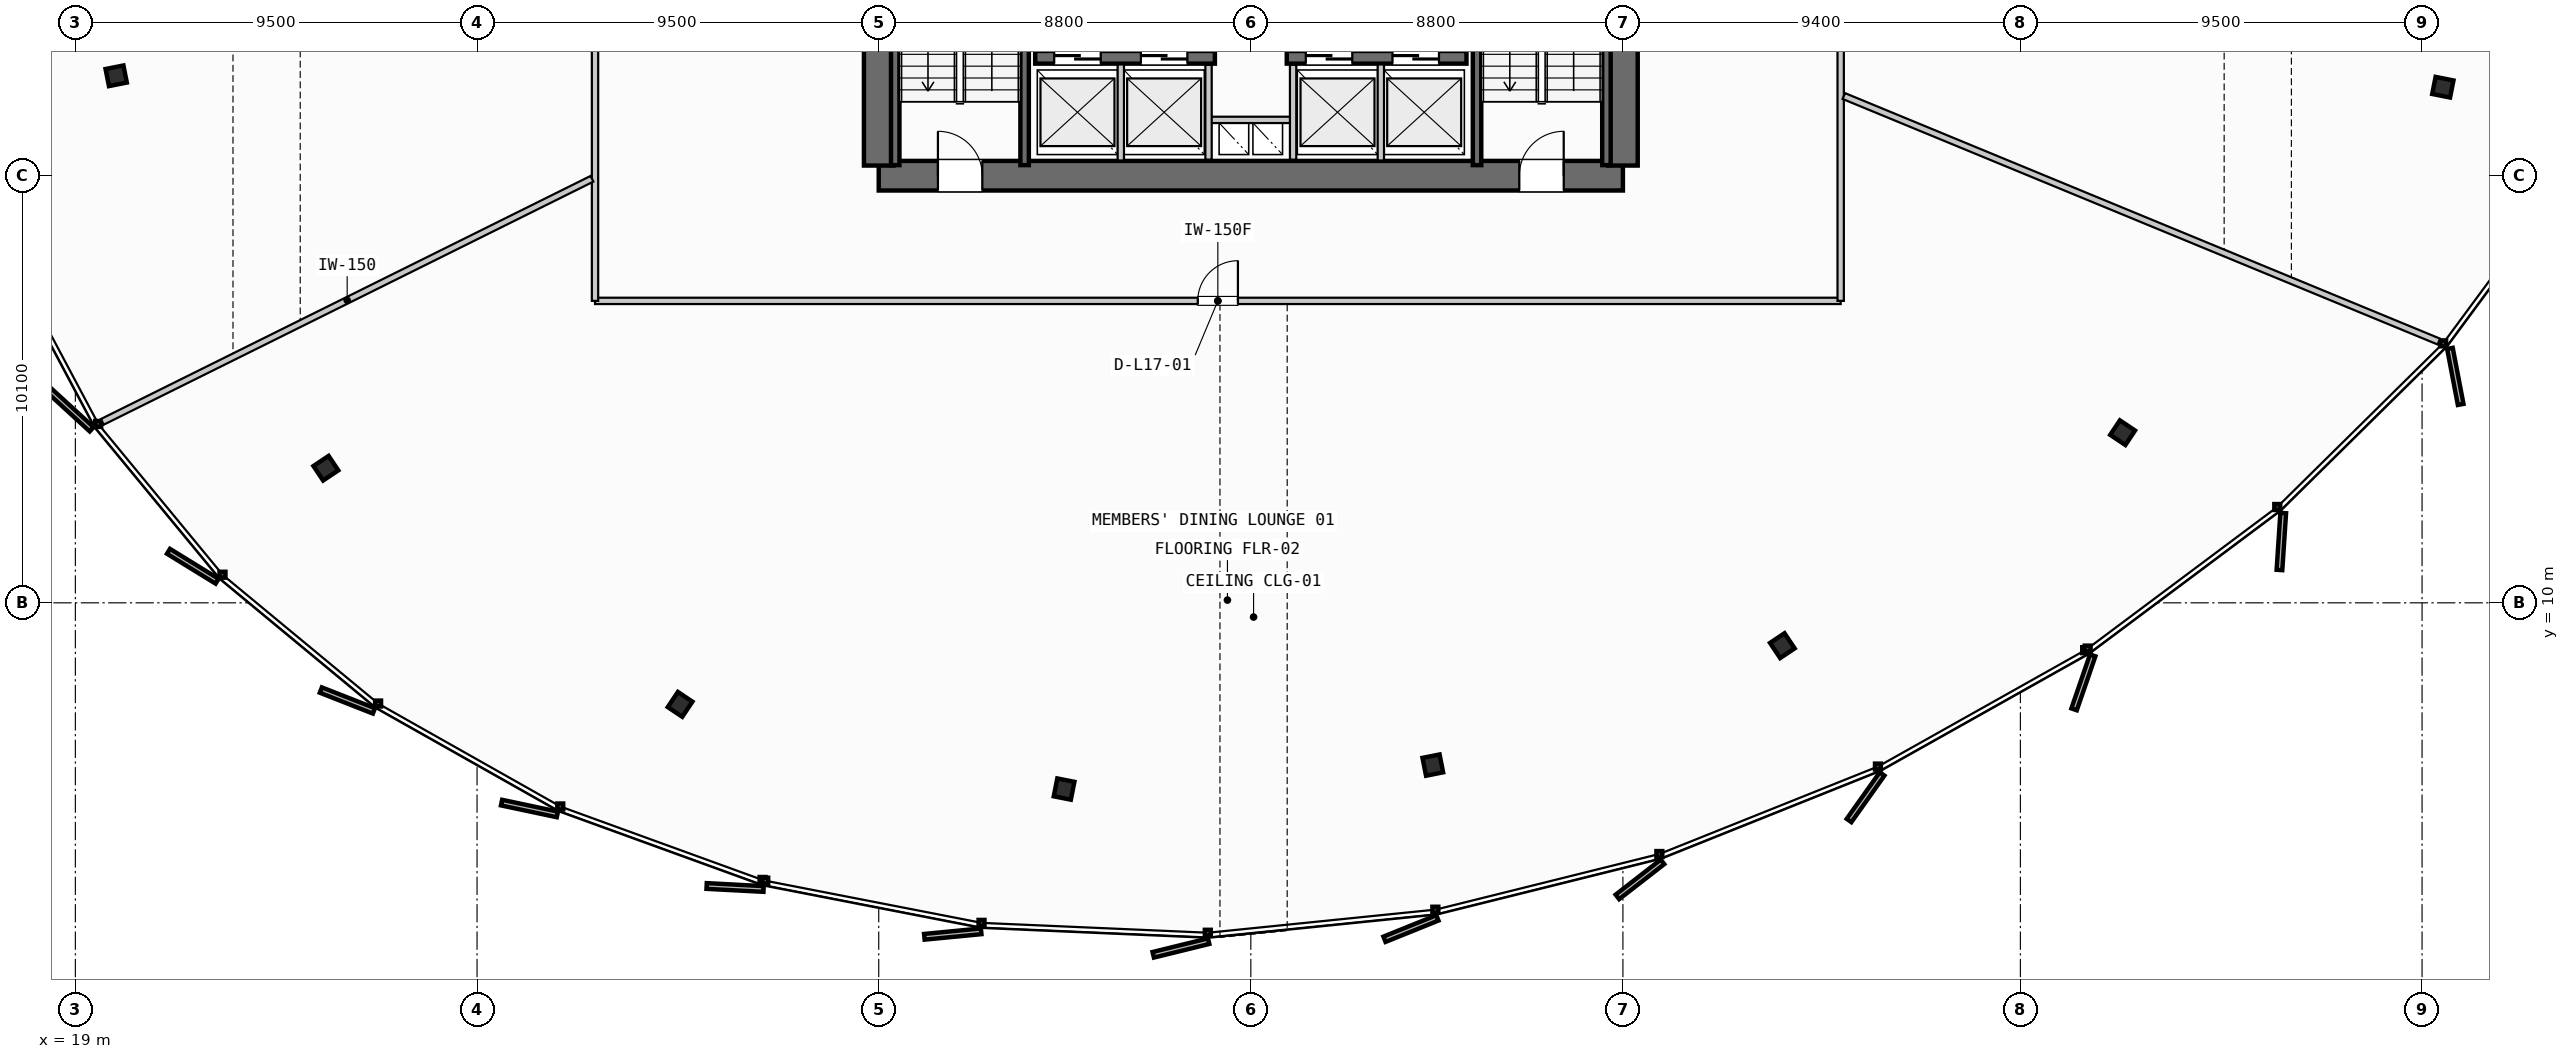
"""IFC4 building model, lengths in metres.
Left out: names, types, materials, properties, quantities, classifications, styles, units other than length and angle.
Written with IfcOpenShell. Run it as: python <this file> out.ifc"""

import sys

from ifc_helpers import new_model, si_unit, direction, frame, frame_2d, origin, origin_2d, place, context, subcontext, project, spatial, rectangle, i_section, extrude, source, transform, mapped, element, fill, save


model = new_model("IFC4")
c1 = context("Model", 3, precision=1e-05, world=origin(), true_north=direction((0.0, 1.0)))
c2 = subcontext(c1, "Body", "Model", "MODEL_VIEW")
j1 = project(units=[si_unit("LENGTHUNIT", "METRE"), si_unit("PLANEANGLEUNIT", "RADIAN")], contexts=[c1])
p1 = place(None, origin())
s1 = spatial("IfcSite", under=j1, at=p1, CompositionType="ELEMENT")
p2 = place(p1, origin())
s2 = spatial("IfcBuilding", under=s1, at=p2, CompositionType="ELEMENT")
p3 = place(p2, frame((0.0, 0.0, 71.4)))
s3 = spatial("IfcBuildingStorey", under=s2, at=p3, CompositionType="ELEMENT", Elevation=71.4)
p4 = place(p3, frame((38.0, 20.1, 0.0), z_axis=(0.0, 0.0, 1.0), x_axis=(1.0, 0.0, 0.0)))
e1 = element("IfcWall", 1, at=p4, inside=s3, PredefinedType="SHEAR", context=c2, shape_type="SweptSolid", body=[
    extrude(rectangle(XDim=17.6, YDim=0.7, at=frame_2d((8.8, 0.0))), origin(), (0.0, 0.0, 1.0), 3.54),
])
p5 = place(p4, frame((1.4, 0.0, 0.0)))
e2 = element("IfcOpeningElement", 2, at=p5, cuts=e1, PredefinedType="OPENING", context=c2, shape_type="SweptSolid", body=[
    extrude(rectangle(XDim=1.05, YDim=2.15, at=frame_2d((0.525, 1.075))), frame((0.0, 0.36, 0.0), z_axis=(0.0, -1.0, 0.0), x_axis=(1.0, 0.0, 0.0)), (0.0, 0.0, 1.0), 0.72),
])
p6 = place(p4, frame((15.15, 0.0, 0.0)))
e3 = element("IfcOpeningElement", 3, at=p6, cuts=e1, PredefinedType="OPENING", context=c2, shape_type="SweptSolid", body=[
    extrude(rectangle(XDim=1.05, YDim=2.15, at=frame_2d((0.525, 1.075))), frame((0.0, 0.36, 0.0), z_axis=(0.0, -1.0, 0.0), x_axis=(1.0, 0.0, 0.0)), (0.0, 0.0, 1.0), 0.72),
])
p7 = place(p3, frame((38.0, 35.26, 0.0), z_axis=(0.0, 0.0, 1.0), x_axis=(0.0, -1.0, 0.0)))
e4 = element("IfcWall", 4, at=p7, inside=s3, PredefinedType="SHEAR", context=c2, shape_type="SweptSolid", body=[
    extrude(rectangle(XDim=14.92, YDim=0.7, at=frame_2d((7.46, 0.0))), origin(), (0.0, 0.0, 1.0), 3.54),
])
p8 = place(p7, frame((5.21, 0.0, 0.0)))
e5 = element("IfcOpeningElement", 5, at=p8, cuts=e4, PredefinedType="OPENING", context=c2, shape_type="SweptSolid", body=[
    extrude(rectangle(XDim=1.1, YDim=2.2, at=frame_2d((0.55, 1.1))), frame((0.0, 0.36, 0.0), z_axis=(0.0, -1.0, 0.0), x_axis=(1.0, 0.0, 0.0)), (0.0, 0.0, 1.0), 0.72),
])
p9 = place(p3, frame((55.6, 20.34, 0.0), z_axis=(0.0, 0.0, 1.0), x_axis=(0.0, 1.0, 0.0)))
e6 = element("IfcWall", 6, at=p9, inside=s3, PredefinedType="SHEAR", context=c2, shape_type="SweptSolid", body=[
    extrude(rectangle(XDim=14.92, YDim=0.7, at=frame_2d((7.46, 0.0))), origin(), (0.0, 0.0, 1.0), 3.54),
])
p10 = place(p9, frame((12.71, 0.0, 0.0)))
e7 = element("IfcOpeningElement", 7, at=p10, cuts=e6, PredefinedType="OPENING", context=c2, shape_type="SweptSolid", body=[
    extrude(rectangle(XDim=1.05, YDim=2.15, at=frame_2d((0.525, 1.075))), frame((0.0, 0.36, 0.0), z_axis=(0.0, -1.0, 0.0), x_axis=(1.0, 0.0, 0.0)), (0.0, 0.0, 1.0), 0.72),
])
p11 = place(p9, frame((8.61, 0.0, 0.0)))
e8 = element("IfcOpeningElement", 8, at=p11, cuts=e6, PredefinedType="OPENING", context=c2, shape_type="SweptSolid", body=[
    extrude(rectangle(XDim=1.1, YDim=2.2, at=frame_2d((0.55, 1.1))), frame((0.0, 0.36, 0.0), z_axis=(0.0, -1.0, 0.0), x_axis=(1.0, 0.0, 0.0)), (0.0, 0.0, 1.0), 0.72),
])
p12 = place(p3, frame((41.7, 22.9, 0.0), z_axis=(0.0, 0.0, 1.0), x_axis=(1.0, 0.0, 0.0)))
e9 = element("IfcWall", 9, at=p12, inside=s3, PredefinedType="SHEAR", context=c2, shape_type="SweptSolid", body=[
    extrude(rectangle(XDim=4.25, YDim=0.3, at=frame_2d((2.125, 0.0))), origin(), (0.0, 0.0, 1.0), 3.54),
])
p13 = place(p12, frame((0.45, 0.0, 0.0)))
e10 = element("IfcOpeningElement", 10, at=p13, cuts=e9, PredefinedType="OPENING", context=c2, shape_type="SweptSolid", body=[
    extrude(rectangle(XDim=1.1, YDim=2.2, at=frame_2d((0.55, 1.1))), frame((0.0, 0.16, 0.0), z_axis=(0.0, -1.0, 0.0), x_axis=(1.0, 0.0, 0.0)), (0.0, 0.0, 1.0), 0.32),
])
p14 = place(p12, frame((2.5, 0.0, 0.0)))
e11 = element("IfcOpeningElement", 11, at=p14, cuts=e9, PredefinedType="OPENING", context=c2, shape_type="SweptSolid", body=[
    extrude(rectangle(XDim=1.1, YDim=2.2, at=frame_2d((0.55, 1.1))), frame((0.0, 0.16, 0.0), z_axis=(0.0, -1.0, 0.0), x_axis=(1.0, 0.0, 0.0)), (0.0, 0.0, 1.0), 0.32),
])
p15 = place(p3, frame((47.65, 22.9, 0.0), z_axis=(0.0, 0.0, 1.0), x_axis=(1.0, 0.0, 0.0)))
e12 = element("IfcWall", 12, at=p15, inside=s3, PredefinedType="SHEAR", context=c2, shape_type="SweptSolid", body=[
    extrude(rectangle(XDim=4.25, YDim=0.3, at=frame_2d((2.125, 0.0))), origin(), (0.0, 0.0, 1.0), 3.54),
])
p16 = place(p15, frame((0.45, 0.0, 0.0)))
e13 = element("IfcOpeningElement", 13, at=p16, cuts=e12, PredefinedType="OPENING", context=c2, shape_type="SweptSolid", body=[
    extrude(rectangle(XDim=1.1, YDim=2.2, at=frame_2d((0.55, 1.1))), frame((0.0, 0.16, 0.0), z_axis=(0.0, -1.0, 0.0), x_axis=(1.0, 0.0, 0.0)), (0.0, 0.0, 1.0), 0.32),
])
p17 = place(p15, frame((2.5, 0.0, 0.0)))
e14 = element("IfcOpeningElement", 14, at=p17, cuts=e12, PredefinedType="OPENING", context=c2, shape_type="SweptSolid", body=[
    extrude(rectangle(XDim=1.1, YDim=2.2, at=frame_2d((0.55, 1.1))), frame((0.0, 0.16, 0.0), z_axis=(0.0, -1.0, 0.0), x_axis=(1.0, 0.0, 0.0)), (0.0, 0.0, 1.0), 0.32),
])
m1 = source(origin(), c2, "Body", "SweptSolid", [
    extrude(i_section(OverallWidth=0.412, OverallDepth=0.431, WebThickness=0.042, FlangeThickness=0.068, FilletRadius=0.015, at=origin_2d()), origin(), (0.0, 0.0, 1.0), 3.54),
])
for number, where, z_axis, x_axis in (
    (15, (19.966, 22.462, 0.0), (0.0, 0.0, 1.0), (-0.981, -0.195, 0.0)),
    (16, (24.925, 13.183, 0.0), (0.0, 0.0, 1.0), (-0.831, -0.556, 0.0)),
    (17, (33.302, 7.599, 0.0), (0.0, 0.0, 1.0), (-0.556, -0.831, 0.0)),
    (18, (42.383, 5.596, 0.0), (0.0, 0.0, 1.0), (-0.195, -0.981, 0.0)),
    (19, (51.104, 6.163, 0.0), (0.0, 0.0, 1.0), (0.195, -0.981, 0.0)),
    (20, (59.37, 8.987, 0.0), (0.0, 0.0, 1.0), (0.556, -0.831, 0.0)),
    (21, (67.418, 14.023, 0.0), (0.0, 0.0, 1.0), (0.831, -0.556, 0.0)),
    (22, (74.991, 22.192, 0.0), (0.0, 0.0, 1.0), (0.981, -0.195, 0.0)),
):
    element("IfcColumn", number, at=place(p3, frame(where, z_axis=z_axis, x_axis=x_axis)), inside=s3, PredefinedType="COLUMN", context=c2, shape_type="MappedRepresentation", body=[
        mapped(m1, transform((0.0, 0.0, 0.0), scale=1.0)),
    ])
for number, where, z_axis, x_axis in (
    (23, (41.45, 27.7, 0.0), (0.0, 0.0, 1.0), (0.0, -1.0, 0.0)),
    (24, (38.39, 20.35, 0.0), (0.0, 0.0, 1.0), (0.0, 1.0, 0.0)),
    (25, (55.21, 27.7, 0.0), (0.0, 0.0, 1.0), (0.0, -1.0, 0.0)),
    (26, (52.15, 20.35, 0.0), (0.0, 0.0, 1.0), (0.0, 1.0, 0.0)),
):
    element("IfcWall", number, at=place(p3, frame(where, z_axis=z_axis, x_axis=x_axis)), inside=s3, PredefinedType="SHEAR", context=c2, shape_type="SweptSolid", body=[
        extrude(rectangle(XDim=7.35, YDim=0.2, at=frame_2d((3.675, 0.0))), origin(), (0.0, 0.0, 1.0), 3.54),
    ])
p18 = place(p3, frame((45.8, 21.42, 0.0), z_axis=(0.0, 0.0, 1.0), x_axis=(1.0, 0.0, 0.0)))
e27 = element("IfcWall", 27, at=p18, inside=s3, PredefinedType="PARTITIONING", context=c2, shape_type="SweptSolid", body=[
    extrude(rectangle(XDim=2.0, YDim=0.15, at=frame_2d((1.0, 0.0))), origin(), (0.0, 0.0, 1.0), 2.495),
])
for number, where, z_axis, x_axis in (
    (28, (45.8, 20.48, 0.0), (0.0, 0.0, 1.0), (0.0, 1.0, 0.0)),
    (29, (47.8, 20.48, 0.0), (0.0, 0.0, 1.0), (0.0, 1.0, 0.0)),
):
    element("IfcWall", number, at=place(p3, frame(where, z_axis=z_axis, x_axis=x_axis)), inside=s3, PredefinedType="PARTITIONING", context=c2, shape_type="SweptSolid", body=[
        extrude(rectangle(XDim=2.24, YDim=0.15, at=frame_2d((1.12, 0.0))), origin(), (0.0, 0.0, 1.0), 2.495),
    ])
for number, where, z_axis, x_axis in (
    (30, (43.725, 20.46, 0.0), (0.0, 0.0, 1.0), (0.0, 1.0, 0.0)),
    (31, (49.875, 20.46, 0.0), (0.0, 0.0, 1.0), (0.0, 1.0, 0.0)),
):
    element("IfcWall", number, at=place(p3, frame(where, z_axis=z_axis, x_axis=x_axis)), inside=s3, PredefinedType="PARTITIONING", context=c2, shape_type="SweptSolid", body=[
        extrude(rectangle(XDim=2.27, YDim=0.15, at=frame_2d((1.135, 0.0))), origin(), (0.0, 0.0, 1.0), 2.495),
    ])
p19 = place(p3, frame((31.29, 17.14, 0.0), z_axis=(0.0, 0.0, 1.0), x_axis=(1.0, 0.0, 0.0)))
e32 = element("IfcWall", 32, at=p19, inside=s3, PredefinedType="PARTITIONING", context=c2, shape_type="SweptSolid", body=[
    extrude(rectangle(XDim=29.46, YDim=0.15, at=frame_2d((14.73, 0.0))), origin(), (0.0, 0.0, 1.0), 2.495),
])
p20 = place(p19, frame((14.255, 0.0, 0.0)))
e33 = element("IfcOpeningElement", 33, at=p20, cuts=e32, PredefinedType="OPENING", context=c2, shape_type="SweptSolid", body=[
    extrude(rectangle(XDim=0.95, YDim=2.15, at=frame_2d((0.475, 1.075))), frame((0.0, 0.085, 0.0), z_axis=(0.0, -1.0, 0.0), x_axis=(1.0, 0.0, 0.0)), (0.0, 0.0, 1.0), 0.17),
])
p21 = place(p3, frame((60.75, 17.14, 0.0), z_axis=(0.0, 0.0, 1.0), x_axis=(0.0, 1.0, 0.0)))
e34 = element("IfcWall", 34, at=p21, inside=s3, PredefinedType="PARTITIONING", context=c2, shape_type="SweptSolid", body=[
    extrude(rectangle(XDim=21.32, YDim=0.15, at=frame_2d((10.66, 0.0))), origin(), (0.0, 0.0, 1.0), 2.495),
])
p22 = place(p21, frame((12.321, 0.0, 0.0)))
e35 = element("IfcOpeningElement", 35, at=p22, cuts=e34, PredefinedType="OPENING", context=c2, shape_type="SweptSolid", body=[
    extrude(rectangle(XDim=0.95, YDim=2.15, at=frame_2d((0.475, 1.075))), frame((0.0, 0.085, 0.0), z_axis=(0.0, -1.0, 0.0), x_axis=(1.0, 0.0, 0.0)), (0.0, 0.0, 1.0), 0.17),
])
p23 = place(p3, frame((31.29, 38.46, 0.0), z_axis=(0.0, 0.0, 1.0), x_axis=(0.0, -1.0, 0.0)))
e36 = element("IfcWall", 36, at=p23, inside=s3, PredefinedType="PARTITIONING", context=c2, shape_type="SweptSolid", body=[
    extrude(rectangle(XDim=21.32, YDim=0.15, at=frame_2d((10.66, 0.0))), origin(), (0.0, 0.0, 1.0), 2.495),
])
p24 = place(p23, frame((10.502, 0.0, 0.0)))
e37 = element("IfcOpeningElement", 37, at=p24, cuts=e36, PredefinedType="OPENING", context=c2, shape_type="SweptSolid", body=[
    extrude(rectangle(XDim=0.95, YDim=2.15, at=frame_2d((0.475, 1.075))), frame((0.0, 0.085, 0.0), z_axis=(0.0, -1.0, 0.0), x_axis=(1.0, 0.0, 0.0)), (0.0, 0.0, 1.0), 0.17),
])
p25 = place(p3, frame((31.218, 20.027, 0.0), z_axis=(0.0, 0.0, 1.0), x_axis=(-0.895741488964, -0.44457528603, 0.0)))
e38 = element("IfcWall", 38, at=p25, inside=s3, PredefinedType="PARTITIONING", context=c2, shape_type="SweptSolid", body=[
    extrude(rectangle(XDim=12.928, YDim=0.15, at=frame_2d((6.464, 0.0))), origin(), (0.0, 0.0, 1.0), 2.495),
])
p26 = place(p3, frame((60.824, 21.984, 0.0), z_axis=(0.0, 0.0, 1.0), x_axis=(0.924417823498, -0.381381289001, 0.0)))
e39 = element("IfcWall", 39, at=p26, inside=s3, PredefinedType="PARTITIONING", context=c2, shape_type="SweptSolid", body=[
    extrude(rectangle(XDim=15.223, YDim=0.15, at=frame_2d((7.612, 0.0))), origin(), (0.0, 0.0, 1.0), 2.495),
])
m2 = source(origin(), c2, "Body", "SweptSolid", [
    extrude(rectangle(XDim=1.05, YDim=2.15, at=frame_2d((0.525, 1.075))), frame((0.0, 0.025, 0.0), z_axis=(0.0, -1.0, 0.0), x_axis=(1.0, 0.0, 0.0)), (0.0, 0.0, 1.0), 0.05),
])
p27 = place(p5, origin())
e40 = element("IfcDoor", 40, at=p27, inside=s3, OperationType="SINGLE_SWING_LEFT", PredefinedType="DOOR", context=c2, shape_type="MappedRepresentation", body=[
    mapped(m2, transform((0.0, 0.0, 0.0), scale=1.0)),
])
fill(e2, e40)
p28 = place(p6, origin())
e41 = element("IfcDoor", 41, at=p28, inside=s3, OperationType="SINGLE_SWING_RIGHT", PredefinedType="DOOR", context=c2, shape_type="MappedRepresentation", body=[
    mapped(m2, transform((0.0, 0.0, 0.0), scale=1.0)),
])
fill(e3, e41)
m3 = source(origin(), c2, "Body", "SweptSolid", [
    extrude(rectangle(XDim=1.1, YDim=2.2, at=frame_2d((0.55, 1.1))), frame((0.0, 0.025, 0.0), z_axis=(0.0, -1.0, 0.0), x_axis=(1.0, 0.0, 0.0)), (0.0, 0.0, 1.0), 0.05),
])
p29 = place(p13, origin())
e42 = element("IfcDoor", 42, at=p29, inside=s3, OperationType="SLIDING_TO_LEFT", PredefinedType="DOOR", context=c2, shape_type="MappedRepresentation", body=[
    mapped(m3, transform((0.0, 0.0, 0.0), scale=1.0)),
])
fill(e10, e42)
p30 = place(p14, origin())
e43 = element("IfcDoor", 43, at=p30, inside=s3, OperationType="SLIDING_TO_LEFT", PredefinedType="DOOR", context=c2, shape_type="MappedRepresentation", body=[
    mapped(m3, transform((0.0, 0.0, 0.0), scale=1.0)),
])
fill(e11, e43)
p31 = place(p16, origin())
e44 = element("IfcDoor", 44, at=p31, inside=s3, OperationType="SLIDING_TO_LEFT", PredefinedType="DOOR", context=c2, shape_type="MappedRepresentation", body=[
    mapped(m3, transform((0.0, 0.0, 0.0), scale=1.0)),
])
fill(e13, e44)
p32 = place(p17, origin())
e45 = element("IfcDoor", 45, at=p32, inside=s3, OperationType="SLIDING_TO_LEFT", PredefinedType="DOOR", context=c2, shape_type="MappedRepresentation", body=[
    mapped(m3, transform((0.0, 0.0, 0.0), scale=1.0)),
])
fill(e14, e45)
m4 = source(origin(), c2, "Body", "SweptSolid", [
    extrude(rectangle(XDim=0.95, YDim=2.15, at=frame_2d((0.475, 1.075))), frame((0.0, 0.025, 0.0), z_axis=(0.0, -1.0, 0.0), x_axis=(1.0, 0.0, 0.0)), (0.0, 0.0, 1.0), 0.05),
])
p33 = place(p20, origin())
e46 = element("IfcDoor", 46, at=p33, inside=s3, OperationType="SINGLE_SWING_RIGHT", PredefinedType="DOOR", context=c2, shape_type="MappedRepresentation", body=[
    mapped(m4, transform((0.0, 0.0, 0.0), scale=1.0)),
])
fill(e33, e46)
save(model, sys.argv[1])
